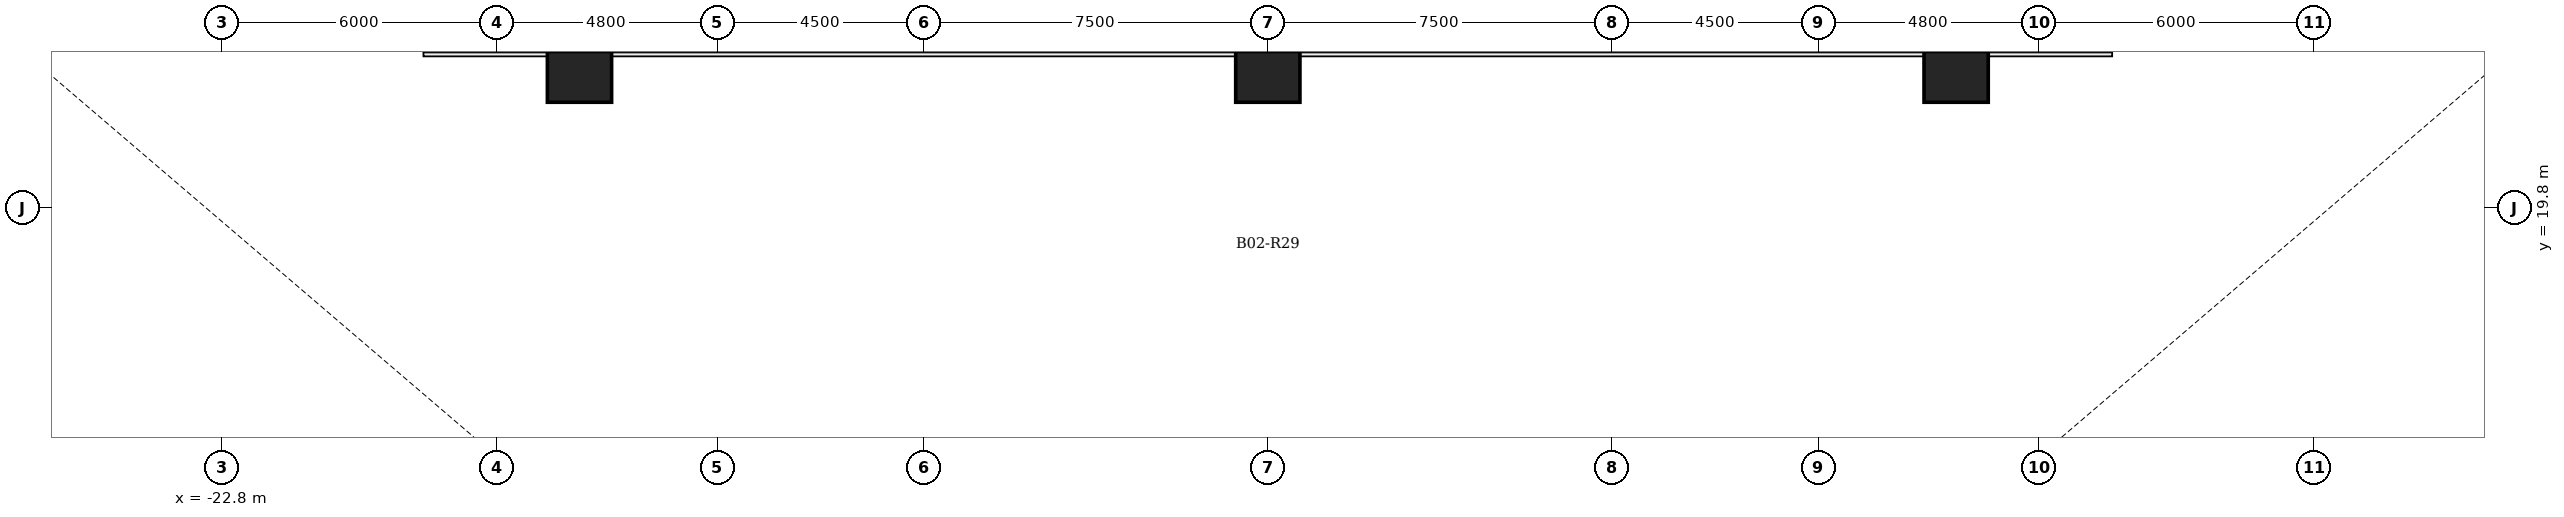
"""IFC4 building model, lengths in metres.
Left out: names, types, materials, properties, quantities, classifications, styles, units other than length and angle.
Written with IfcOpenShell. Run it as: python <this file> out.ifc"""

import sys

from ifc_helpers import new_model, si_unit, direction, frame, origin, origin_2d, place, context, subcontext, project, spatial, rectangle, extrude, element, save


model = new_model("IFC4")
c1 = context("Model", 3, precision=1e-05, world=origin(), true_north=direction((0.0, 1.0)))
c2 = subcontext(c1, "Body", "Model", "MODEL_VIEW")
j1 = project(units=[si_unit("LENGTHUNIT", "METRE"), si_unit("PLANEANGLEUNIT", "RADIAN")], contexts=[c1])
p1 = place(None, origin())
s1 = spatial("IfcSite", under=j1, at=p1, CompositionType="ELEMENT")
p2 = place(p1, origin())
s2 = spatial("IfcBuilding", under=s1, at=p2, CompositionType="ELEMENT")
p3 = place(p2, frame((0.0, 0.0, -9.2)))
s3 = spatial("IfcBuildingStorey", under=s2, at=p3, CompositionType="ELEMENT", Elevation=-9.2)
for number, where, z_axis, x_axis in (
    (1, (-15.0, 22.8, 0.0), (0.0, 0.0, 1.0), (1.0, 0.0, 0.0)),
    (2, (0.0, 22.8, 0.0), (0.0, 0.0, 1.0), (1.0, 0.0, 0.0)),
    (3, (15.0, 22.8, 0.0), (0.0, 0.0, 1.0), (1.0, 0.0, 0.0)),
):
    element("IfcColumn", number, at=place(p3, frame(where, z_axis=z_axis, x_axis=x_axis)), inside=s3, PredefinedType="COLUMN", context=c2, shape_type="SweptSolid", body=[
        extrude(rectangle(XDim=1.4, YDim=1.4, at=origin_2d()), origin(), (0.0, 0.0, 1.0), 4.6),
    ])
save(model, sys.argv[1])
